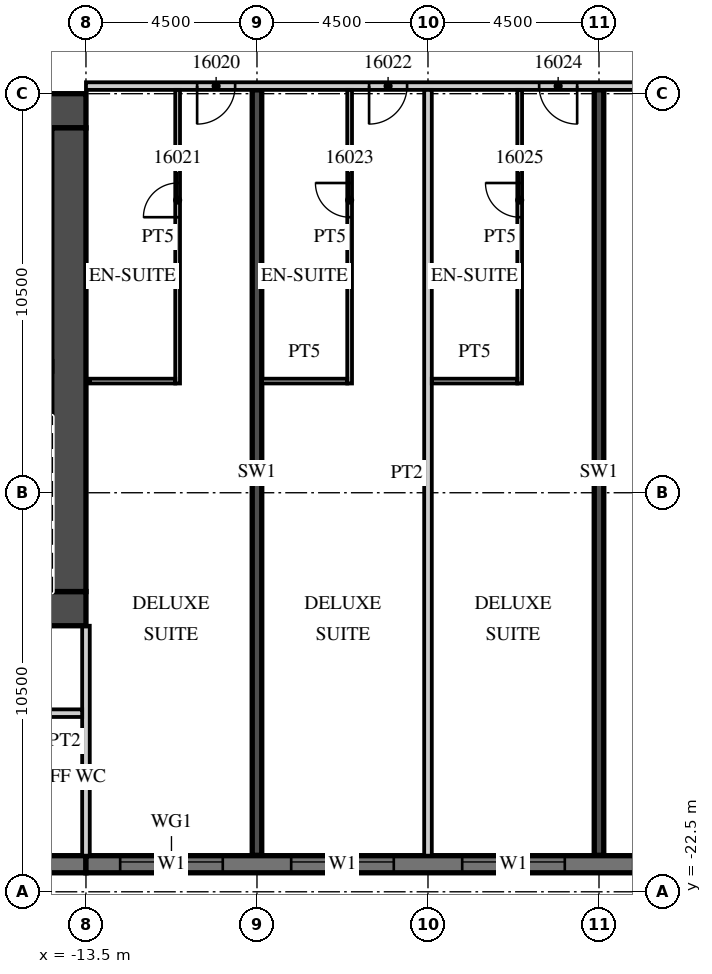
"""IFC4 building model, lengths in metres.
Left out: names, types, materials, properties, quantities, classifications, styles, units other than length and angle.
Written with IfcOpenShell. Run it as: python <this file> out.ifc"""

import sys

from ifc_helpers import new_model, si_unit, direction, frame, frame_2d, origin, place, context, subcontext, project, spatial, rectangle, extrude, element, fill, save


model = new_model("IFC4")
c1 = context("Model", 3, precision=1e-05, world=origin(), true_north=direction((0.0, 1.0)))
c2 = subcontext(c1, "Body", "Model", "MODEL_VIEW")
j1 = project(units=[si_unit("LENGTHUNIT", "METRE"), si_unit("PLANEANGLEUNIT", "RADIAN")], contexts=[c1])
p1 = place(None, origin())
s1 = spatial("IfcSite", under=j1, at=p1, CompositionType="ELEMENT")
p2 = place(p1, origin())
s2 = spatial("IfcBuilding", under=s1, at=p2, CompositionType="ELEMENT")
p3 = place(p2, frame((0.0, 0.0, 83.1)))
s3 = spatial("IfcBuildingStorey", under=s2, at=p3, CompositionType="ELEMENT", Elevation=83.1)
for number, where, z_axis, x_axis in (
    (1, (-9.0, -21.54, 0.0), (0.0, 0.0, 1.0), (0.0, 1.0, 0.0)),
    (2, (0.0, -21.54, 0.0), (0.0, 0.0, 1.0), (0.0, 1.0, 0.0)),
):
    element("IfcWall", number, at=place(p3, frame(where, z_axis=z_axis, x_axis=x_axis)), inside=s3, PredefinedType="SHEAR", context=c2, shape_type="SweptSolid", body=[
        extrude(rectangle(XDim=20.14, YDim=0.25, at=frame_2d((10.07, 0.0))), origin(), (0.0, 0.0, 1.0), 3.3),
    ])
p4 = place(p3, frame((-31.5, -21.775, 0.0), z_axis=(0.0, 0.0, 1.0), x_axis=(1.0, 0.0, 0.0)))
e3 = element("IfcWall", 3, at=p4, inside=s3, PredefinedType="SOLIDWALL", context=c2, shape_type="SweptSolid", body=[
    extrude(rectangle(XDim=18.0, YDim=0.45, at=frame_2d((9.0, 0.0))), origin(), (0.0, 0.0, 1.0), 3.02),
])
p5 = place(p3, frame((-13.5, -21.775, 0.0), z_axis=(0.0, 0.0, 1.0), x_axis=(1.0, 0.0, 0.0)))
e4 = element("IfcWall", 4, at=p5, inside=s3, PredefinedType="SOLIDWALL", context=c2, shape_type="SweptSolid", body=[
    extrude(rectangle(XDim=54.5, YDim=0.45, at=frame_2d((27.25, 0.0))), origin(), (0.0, 0.0, 1.0), 3.02),
])
p6 = place(p5, frame((0.9, 0.0, 0.45)))
e5 = element("IfcOpeningElement", 5, at=p6, cuts=e4, PredefinedType="OPENING", context=c2, shape_type="SweptSolid", body=[
    extrude(rectangle(XDim=2.7, YDim=2.25, at=frame_2d((1.35, 1.125))), frame((0.0, 0.235, 0.0), z_axis=(0.0, -1.0, 0.0), x_axis=(1.0, 0.0, 0.0)), (0.0, 0.0, 1.0), 0.47),
])
p7 = place(p5, frame((5.4, 0.0, 0.45)))
e6 = element("IfcOpeningElement", 6, at=p7, cuts=e4, PredefinedType="OPENING", context=c2, shape_type="SweptSolid", body=[
    extrude(rectangle(XDim=2.7, YDim=2.25, at=frame_2d((1.35, 1.125))), frame((0.0, 0.235, 0.0), z_axis=(0.0, -1.0, 0.0), x_axis=(1.0, 0.0, 0.0)), (0.0, 0.0, 1.0), 0.47),
])
p8 = place(p5, frame((9.9, 0.0, 0.45)))
e7 = element("IfcOpeningElement", 7, at=p8, cuts=e4, PredefinedType="OPENING", context=c2, shape_type="SweptSolid", body=[
    extrude(rectangle(XDim=2.7, YDim=2.25, at=frame_2d((1.35, 1.125))), frame((0.0, 0.235, 0.0), z_axis=(0.0, -1.0, 0.0), x_axis=(1.0, 0.0, 0.0)), (0.0, 0.0, 1.0), 0.47),
])
p9 = place(p5, frame((14.4, 0.0, 0.45)))
e8 = element("IfcOpeningElement", 8, at=p9, cuts=e4, PredefinedType="OPENING", context=c2, shape_type="SweptSolid", body=[
    extrude(rectangle(XDim=2.7, YDim=2.25, at=frame_2d((1.35, 1.125))), frame((0.0, 0.235, 0.0), z_axis=(0.0, -1.0, 0.0), x_axis=(1.0, 0.0, 0.0)), (0.0, 0.0, 1.0), 0.47),
])
p10 = place(p5, frame((18.9, 0.0, 0.45)))
e9 = element("IfcOpeningElement", 9, at=p10, cuts=e4, PredefinedType="OPENING", context=c2, shape_type="SweptSolid", body=[
    extrude(rectangle(XDim=2.7, YDim=2.25, at=frame_2d((1.35, 1.125))), frame((0.0, 0.235, 0.0), z_axis=(0.0, -1.0, 0.0), x_axis=(1.0, 0.0, 0.0)), (0.0, 0.0, 1.0), 0.47),
])
p11 = place(p5, frame((23.4, 0.0, 0.45)))
e10 = element("IfcOpeningElement", 10, at=p11, cuts=e4, PredefinedType="OPENING", context=c2, shape_type="SweptSolid", body=[
    extrude(rectangle(XDim=2.7, YDim=2.25, at=frame_2d((1.35, 1.125))), frame((0.0, 0.235, 0.0), z_axis=(0.0, -1.0, 0.0), x_axis=(1.0, 0.0, 0.0)), (0.0, 0.0, 1.0), 0.47),
])
p12 = place(p5, frame((27.9, 0.0, 0.45)))
e11 = element("IfcOpeningElement", 11, at=p12, cuts=e4, PredefinedType="OPENING", context=c2, shape_type="SweptSolid", body=[
    extrude(rectangle(XDim=2.7, YDim=2.25, at=frame_2d((1.35, 1.125))), frame((0.0, 0.235, 0.0), z_axis=(0.0, -1.0, 0.0), x_axis=(1.0, 0.0, 0.0)), (0.0, 0.0, 1.0), 0.47),
])
p13 = place(p5, frame((32.4, 0.0, 0.45)))
e12 = element("IfcOpeningElement", 12, at=p13, cuts=e4, PredefinedType="OPENING", context=c2, shape_type="SweptSolid", body=[
    extrude(rectangle(XDim=2.7, YDim=2.25, at=frame_2d((1.35, 1.125))), frame((0.0, 0.235, 0.0), z_axis=(0.0, -1.0, 0.0), x_axis=(1.0, 0.0, 0.0)), (0.0, 0.0, 1.0), 0.47),
])
p14 = place(p5, frame((36.9, 0.0, 0.45)))
e13 = element("IfcOpeningElement", 13, at=p14, cuts=e4, PredefinedType="OPENING", context=c2, shape_type="SweptSolid", body=[
    extrude(rectangle(XDim=2.7, YDim=2.25, at=frame_2d((1.35, 1.125))), frame((0.0, 0.235, 0.0), z_axis=(0.0, -1.0, 0.0), x_axis=(1.0, 0.0, 0.0)), (0.0, 0.0, 1.0), 0.47),
])
p15 = place(p5, frame((41.4, 0.0, 0.45)))
e14 = element("IfcOpeningElement", 14, at=p15, cuts=e4, PredefinedType="OPENING", context=c2, shape_type="SweptSolid", body=[
    extrude(rectangle(XDim=2.7, YDim=2.25, at=frame_2d((1.35, 1.125))), frame((0.0, 0.235, 0.0), z_axis=(0.0, -1.0, 0.0), x_axis=(1.0, 0.0, 0.0)), (0.0, 0.0, 1.0), 0.47),
])
p16 = place(p5, frame((45.9, 0.0, 0.45)))
e15 = element("IfcOpeningElement", 15, at=p16, cuts=e4, PredefinedType="OPENING", context=c2, shape_type="SweptSolid", body=[
    extrude(rectangle(XDim=2.7, YDim=2.25, at=frame_2d((1.35, 1.125))), frame((0.0, 0.235, 0.0), z_axis=(0.0, -1.0, 0.0), x_axis=(1.0, 0.0, 0.0)), (0.0, 0.0, 1.0), 0.47),
])
p17 = place(p5, frame((50.4, 0.0, 0.45)))
e16 = element("IfcOpeningElement", 16, at=p17, cuts=e4, PredefinedType="OPENING", context=c2, shape_type="SweptSolid", body=[
    extrude(rectangle(XDim=2.7, YDim=2.25, at=frame_2d((1.35, 1.125))), frame((0.0, 0.235, 0.0), z_axis=(0.0, -1.0, 0.0), x_axis=(1.0, 0.0, 0.0)), (0.0, 0.0, 1.0), 0.47),
])
p18 = place(p3, frame((-13.5, -21.55, 0.0), z_axis=(0.0, 0.0, 1.0), x_axis=(0.0, 1.0, 0.0)))
e17 = element("IfcWall", 17, at=p18, inside=s3, PredefinedType="PARTITIONING", context=c2, shape_type="SweptSolid", body=[
    extrude(rectangle(XDim=6.05, YDim=0.2, at=frame_2d((3.025, 0.0))), origin(), (0.0, 0.0, 1.0), 3.02),
])
p19 = place(p3, frame((-13.5, -1.3, 0.0), z_axis=(0.0, 0.0, 1.0), x_axis=(1.0, 0.0, 0.0)))
e18 = element("IfcWall", 18, at=p19, inside=s3, PredefinedType="PARTITIONING", context=c2, shape_type="SweptSolid", body=[
    extrude(rectangle(XDim=58.05, YDim=0.2, at=frame_2d((29.025, 0.0))), origin(), (0.0, 0.0, 1.0), 3.02),
])
p20 = place(p19, frame((2.925, 0.0, 0.0)))
e19 = element("IfcOpeningElement", 19, at=p20, cuts=e18, PredefinedType="OPENING", context=c2, shape_type="SweptSolid", body=[
    extrude(rectangle(XDim=1.0, YDim=2.1, at=frame_2d((0.5, 1.05))), frame((0.0, 0.11, 0.0), z_axis=(0.0, -1.0, 0.0), x_axis=(1.0, 0.0, 0.0)), (0.0, 0.0, 1.0), 0.22),
])
p21 = place(p19, frame((7.45, 0.0, 0.0)))
e20 = element("IfcOpeningElement", 20, at=p21, cuts=e18, PredefinedType="OPENING", context=c2, shape_type="SweptSolid", body=[
    extrude(rectangle(XDim=1.0, YDim=2.1, at=frame_2d((0.5, 1.05))), frame((0.0, 0.11, 0.0), z_axis=(0.0, -1.0, 0.0), x_axis=(1.0, 0.0, 0.0)), (0.0, 0.0, 1.0), 0.22),
])
p22 = place(p19, frame((11.925, 0.0, 0.0)))
e21 = element("IfcOpeningElement", 21, at=p22, cuts=e18, PredefinedType="OPENING", context=c2, shape_type="SweptSolid", body=[
    extrude(rectangle(XDim=1.0, YDim=2.1, at=frame_2d((0.5, 1.05))), frame((0.0, 0.11, 0.0), z_axis=(0.0, -1.0, 0.0), x_axis=(1.0, 0.0, 0.0)), (0.0, 0.0, 1.0), 0.22),
])
p23 = place(p19, frame((15.938, 0.0, 0.0)))
e22 = element("IfcOpeningElement", 22, at=p23, cuts=e18, PredefinedType="OPENING", context=c2, shape_type="SweptSolid", body=[
    extrude(rectangle(XDim=1.2, YDim=2.1, at=frame_2d((0.6, 1.05))), frame((0.0, 0.11, 0.0), z_axis=(0.0, -1.0, 0.0), x_axis=(1.0, 0.0, 0.0)), (0.0, 0.0, 1.0), 0.22),
])
p24 = place(p19, frame((25.45, 0.0, 0.0)))
e23 = element("IfcOpeningElement", 23, at=p24, cuts=e18, PredefinedType="OPENING", context=c2, shape_type="SweptSolid", body=[
    extrude(rectangle(XDim=1.0, YDim=2.1, at=frame_2d((0.5, 1.05))), frame((0.0, 0.11, 0.0), z_axis=(0.0, -1.0, 0.0), x_axis=(1.0, 0.0, 0.0)), (0.0, 0.0, 1.0), 0.22),
])
p25 = place(p19, frame((29.925, 0.0, 0.0)))
e24 = element("IfcOpeningElement", 24, at=p25, cuts=e18, PredefinedType="OPENING", context=c2, shape_type="SweptSolid", body=[
    extrude(rectangle(XDim=1.0, YDim=2.1, at=frame_2d((0.5, 1.05))), frame((0.0, 0.11, 0.0), z_axis=(0.0, -1.0, 0.0), x_axis=(1.0, 0.0, 0.0)), (0.0, 0.0, 1.0), 0.22),
])
p26 = place(p19, frame((36.862, 0.0, 0.0)))
e25 = element("IfcOpeningElement", 25, at=p26, cuts=e18, PredefinedType="OPENING", context=c2, shape_type="SweptSolid", body=[
    extrude(rectangle(XDim=1.2, YDim=2.1, at=frame_2d((0.6, 1.05))), frame((0.0, 0.11, 0.0), z_axis=(0.0, -1.0, 0.0), x_axis=(1.0, 0.0, 0.0)), (0.0, 0.0, 1.0), 0.22),
])
p27 = place(p19, frame((41.075, 0.0, 0.0)))
e26 = element("IfcOpeningElement", 26, at=p27, cuts=e18, PredefinedType="OPENING", context=c2, shape_type="SweptSolid", body=[
    extrude(rectangle(XDim=1.0, YDim=2.1, at=frame_2d((0.5, 1.05))), frame((0.0, 0.11, 0.0), z_axis=(0.0, -1.0, 0.0), x_axis=(1.0, 0.0, 0.0)), (0.0, 0.0, 1.0), 0.22),
])
p28 = place(p19, frame((45.55, 0.0, 0.0)))
e27 = element("IfcOpeningElement", 27, at=p28, cuts=e18, PredefinedType="OPENING", context=c2, shape_type="SweptSolid", body=[
    extrude(rectangle(XDim=1.0, YDim=2.1, at=frame_2d((0.5, 1.05))), frame((0.0, 0.11, 0.0), z_axis=(0.0, -1.0, 0.0), x_axis=(1.0, 0.0, 0.0)), (0.0, 0.0, 1.0), 0.22),
])
p29 = place(p19, frame((52.425, 0.0, 0.0)))
e28 = element("IfcOpeningElement", 28, at=p29, cuts=e18, PredefinedType="OPENING", context=c2, shape_type="SweptSolid", body=[
    extrude(rectangle(XDim=1.0, YDim=2.1, at=frame_2d((0.5, 1.05))), frame((0.0, 0.11, 0.0), z_axis=(0.0, -1.0, 0.0), x_axis=(1.0, 0.0, 0.0)), (0.0, 0.0, 1.0), 0.22),
])
p30 = place(p19, frame((56.525, 0.0, 0.0)))
e29 = element("IfcOpeningElement", 29, at=p30, cuts=e18, PredefinedType="OPENING", context=c2, shape_type="SweptSolid", body=[
    extrude(rectangle(XDim=1.0, YDim=2.1, at=frame_2d((0.5, 1.05))), frame((0.0, 0.11, 0.0), z_axis=(0.0, -1.0, 0.0), x_axis=(1.0, 0.0, 0.0)), (0.0, 0.0, 1.0), 0.22),
])
p31 = place(p3, frame((-11.088, -9.125, 0.0), z_axis=(0.0, 0.0, 1.0), x_axis=(0.0, 1.0, 0.0)))
e30 = element("IfcWall", 30, at=p31, inside=s3, PredefinedType="PARTITIONING", context=c2, shape_type="SweptSolid", body=[
    extrude(rectangle(XDim=7.725, YDim=0.125, at=frame_2d((3.863, 0.0))), origin(), (0.0, 0.0, 1.0), 3.02),
])
p32 = place(p31, frame((4.375, 0.0, 0.0)))
e31 = element("IfcOpeningElement", 31, at=p32, cuts=e30, PredefinedType="OPENING", context=c2, shape_type="SweptSolid", body=[
    extrude(rectangle(XDim=0.9, YDim=2.1, at=frame_2d((0.45, 1.05))), frame((0.0, 0.073, 0.0), z_axis=(0.0, -1.0, 0.0), x_axis=(1.0, 0.0, 0.0)), (0.0, 0.0, 1.0), 0.145),
])
p33 = place(p3, frame((-13.4, -9.062, 0.0), z_axis=(0.0, 0.0, 1.0), x_axis=(1.0, 0.0, 0.0)))
e32 = element("IfcWall", 32, at=p33, inside=s3, PredefinedType="PARTITIONING", context=c2, shape_type="SweptSolid", body=[
    extrude(rectangle(XDim=2.25, YDim=0.125, at=frame_2d((1.125, 0.0))), origin(), (0.0, 0.0, 1.0), 3.02),
])
p34 = place(p3, frame((-4.5, -21.55, 0.0), z_axis=(0.0, 0.0, 1.0), x_axis=(0.0, 1.0, 0.0)))
e33 = element("IfcWall", 33, at=p34, inside=s3, PredefinedType="PARTITIONING", context=c2, shape_type="SweptSolid", body=[
    extrude(rectangle(XDim=20.15, YDim=0.2, at=frame_2d((10.075, 0.0))), origin(), (0.0, 0.0, 1.0), 3.02),
])
p35 = place(p3, frame((-6.562, -9.125, 0.0), z_axis=(0.0, 0.0, 1.0), x_axis=(0.0, 1.0, 0.0)))
e34 = element("IfcWall", 34, at=p35, inside=s3, PredefinedType="PARTITIONING", context=c2, shape_type="SweptSolid", body=[
    extrude(rectangle(XDim=7.725, YDim=0.125, at=frame_2d((3.863, 0.0))), origin(), (0.0, 0.0, 1.0), 3.02),
])
p36 = place(p35, frame((4.375, 0.0, 0.0)))
e35 = element("IfcOpeningElement", 35, at=p36, cuts=e34, PredefinedType="OPENING", context=c2, shape_type="SweptSolid", body=[
    extrude(rectangle(XDim=0.9, YDim=2.1, at=frame_2d((0.45, 1.05))), frame((0.0, 0.073, 0.0), z_axis=(0.0, -1.0, 0.0), x_axis=(1.0, 0.0, 0.0)), (0.0, 0.0, 1.0), 0.145),
])
p37 = place(p3, frame((-8.875, -9.062, 0.0), z_axis=(0.0, 0.0, 1.0), x_axis=(1.0, 0.0, 0.0)))
e36 = element("IfcWall", 36, at=p37, inside=s3, PredefinedType="PARTITIONING", context=c2, shape_type="SweptSolid", body=[
    extrude(rectangle(XDim=2.25, YDim=0.125, at=frame_2d((1.125, 0.0))), origin(), (0.0, 0.0, 1.0), 3.02),
])
p38 = place(p3, frame((-2.087, -9.125, 0.0), z_axis=(0.0, 0.0, 1.0), x_axis=(0.0, 1.0, 0.0)))
e37 = element("IfcWall", 37, at=p38, inside=s3, PredefinedType="PARTITIONING", context=c2, shape_type="SweptSolid", body=[
    extrude(rectangle(XDim=7.725, YDim=0.125, at=frame_2d((3.863, 0.0))), origin(), (0.0, 0.0, 1.0), 3.02),
])
p39 = place(p38, frame((4.375, 0.0, 0.0)))
e38 = element("IfcOpeningElement", 38, at=p39, cuts=e37, PredefinedType="OPENING", context=c2, shape_type="SweptSolid", body=[
    extrude(rectangle(XDim=0.9, YDim=2.1, at=frame_2d((0.45, 1.05))), frame((0.0, 0.073, 0.0), z_axis=(0.0, -1.0, 0.0), x_axis=(1.0, 0.0, 0.0)), (0.0, 0.0, 1.0), 0.145),
])
p40 = place(p3, frame((-4.4, -9.062, 0.0), z_axis=(0.0, 0.0, 1.0), x_axis=(1.0, 0.0, 0.0)))
e39 = element("IfcWall", 39, at=p40, inside=s3, PredefinedType="PARTITIONING", context=c2, shape_type="SweptSolid", body=[
    extrude(rectangle(XDim=2.25, YDim=0.125, at=frame_2d((1.125, 0.0))), origin(), (0.0, 0.0, 1.0), 3.02),
])
p41 = place(p3, frame((-31.5, -1.95, 0.0), z_axis=(0.0, 0.0, 1.0), x_axis=(1.0, 0.0, 0.0)))
e40 = element("IfcWall", 40, at=p41, inside=s3, PredefinedType="SHEAR", context=c2, shape_type="SweptSolid", body=[
    extrude(rectangle(XDim=18.0, YDim=0.9, at=frame_2d((9.0, 0.0))), origin(), (0.0, 0.0, 1.0), 3.02),
])
p42 = place(p41, frame((14.725, 0.0, 0.0)))
e41 = element("IfcOpeningElement", 41, at=p42, cuts=e40, PredefinedType="OPENING", context=c2, shape_type="SweptSolid", body=[
    extrude(rectangle(XDim=1.8, YDim=2.1, at=frame_2d((0.9, 1.05))), frame((0.0, 0.46, 0.0), z_axis=(0.0, -1.0, 0.0), x_axis=(1.0, 0.0, 0.0)), (0.0, 0.0, 1.0), 0.92),
])
p43 = place(p3, frame((-20.3, -15.05, 0.0), z_axis=(0.0, 0.0, 1.0), x_axis=(1.0, 0.0, 0.0)))
e42 = element("IfcWall", 42, at=p43, inside=s3, PredefinedType="SHEAR", context=c2, shape_type="SweptSolid", body=[
    extrude(rectangle(XDim=6.8, YDim=0.9, at=frame_2d((3.4, 0.0))), origin(), (0.0, 0.0, 1.0), 3.02),
])
p44 = place(p43, frame((0.875, 0.0, 0.0)))
e43 = element("IfcOpeningElement", 43, at=p44, cuts=e42, PredefinedType="OPENING", context=c2, shape_type="SweptSolid", body=[
    extrude(rectangle(XDim=1.2, YDim=2.1, at=frame_2d((0.6, 1.05))), frame((0.0, 0.46, 0.0), z_axis=(0.0, -1.0, 0.0), x_axis=(1.0, 0.0, 0.0)), (0.0, 0.0, 1.0), 0.92),
])
p45 = place(p3, frame((-13.95, -14.6, 0.0), z_axis=(0.0, 0.0, 1.0), x_axis=(0.0, 1.0, 0.0)))
e44 = element("IfcWall", 44, at=p45, inside=s3, PredefinedType="SHEAR", context=c2, shape_type="SweptSolid", body=[
    extrude(rectangle(XDim=12.2, YDim=0.9, at=frame_2d((6.1, 0.0))), origin(), (0.0, 0.0, 1.0), 3.02),
])
p46 = place(p3, frame((-44.55, -17.8, 0.0), z_axis=(0.0, 0.0, 1.0), x_axis=(1.0, 0.0, 0.0)))
e45 = element("IfcWall", 45, at=p46, inside=s3, PredefinedType="PARTITIONING", context=c2, shape_type="SweptSolid", body=[
    extrude(rectangle(XDim=30.95, YDim=0.2, at=frame_2d((15.475, 0.0))), origin(), (0.0, 0.0, 1.0), 3.02),
])
p47 = place(p46, frame((15.038, 0.0, 0.0)))
e46 = element("IfcOpeningElement", 46, at=p47, cuts=e45, PredefinedType="OPENING", context=c2, shape_type="SweptSolid", body=[
    extrude(rectangle(XDim=0.9, YDim=2.1, at=frame_2d((0.45, 1.05))), frame((0.0, 0.11, 0.0), z_axis=(0.0, -1.0, 0.0), x_axis=(1.0, 0.0, 0.0)), (0.0, 0.0, 1.0), 0.22),
])
p48 = place(p46, frame((23.337, 0.0, 0.0)))
e47 = element("IfcOpeningElement", 47, at=p48, cuts=e45, PredefinedType="OPENING", context=c2, shape_type="SweptSolid", body=[
    extrude(rectangle(XDim=0.9, YDim=2.1, at=frame_2d((0.45, 1.05))), frame((0.0, 0.11, 0.0), z_axis=(0.0, -1.0, 0.0), x_axis=(1.0, 0.0, 0.0)), (0.0, 0.0, 1.0), 0.22),
])
p49 = place(p6, origin())
e48 = element("IfcWindow", 48, at=p49, inside=s3, PartitioningType="SINGLE_PANEL", PredefinedType="WINDOW", context=c2, shape_type="SweptSolid", body=[
    extrude(rectangle(XDim=2.7, YDim=2.25, at=frame_2d((1.35, 1.125))), frame((0.0, 0.09, 0.0), z_axis=(0.0, -1.0, 0.0), x_axis=(1.0, 0.0, 0.0)), (0.0, 0.0, 1.0), 0.06),
])
fill(e5, e48)
p50 = place(p7, origin())
e49 = element("IfcWindow", 49, at=p50, inside=s3, PartitioningType="SINGLE_PANEL", PredefinedType="WINDOW", context=c2, shape_type="SweptSolid", body=[
    extrude(rectangle(XDim=2.7, YDim=2.25, at=frame_2d((1.35, 1.125))), frame((0.0, 0.09, 0.0), z_axis=(0.0, -1.0, 0.0), x_axis=(1.0, 0.0, 0.0)), (0.0, 0.0, 1.0), 0.06),
])
fill(e6, e49)
p51 = place(p8, origin())
e50 = element("IfcWindow", 50, at=p51, inside=s3, PartitioningType="SINGLE_PANEL", PredefinedType="WINDOW", context=c2, shape_type="SweptSolid", body=[
    extrude(rectangle(XDim=2.7, YDim=2.25, at=frame_2d((1.35, 1.125))), frame((0.0, 0.09, 0.0), z_axis=(0.0, -1.0, 0.0), x_axis=(1.0, 0.0, 0.0)), (0.0, 0.0, 1.0), 0.06),
])
fill(e7, e50)
p52 = place(p20, origin())
e51 = element("IfcDoor", 51, at=p52, inside=s3, OperationType="SINGLE_SWING_LEFT", PredefinedType="DOOR", context=c2, shape_type="SweptSolid", body=[
    extrude(rectangle(XDim=1.0, YDim=2.1, at=frame_2d((0.5, 1.05))), frame((0.0, 0.025, 0.0), z_axis=(0.0, -1.0, 0.0), x_axis=(1.0, 0.0, 0.0)), (0.0, 0.0, 1.0), 0.05),
])
fill(e19, e51)
p53 = place(p32, origin())
e52 = element("IfcDoor", 52, at=p53, inside=s3, OperationType="SINGLE_SWING_LEFT", PredefinedType="DOOR", context=c2, shape_type="SweptSolid", body=[
    extrude(rectangle(XDim=0.9, YDim=2.1, at=frame_2d((0.45, 1.05))), frame((0.0, 0.025, 0.0), z_axis=(0.0, -1.0, 0.0), x_axis=(1.0, 0.0, 0.0)), (0.0, 0.0, 1.0), 0.05),
])
fill(e31, e52)
p54 = place(p21, origin())
e53 = element("IfcDoor", 53, at=p54, inside=s3, OperationType="SINGLE_SWING_LEFT", PredefinedType="DOOR", context=c2, shape_type="SweptSolid", body=[
    extrude(rectangle(XDim=1.0, YDim=2.1, at=frame_2d((0.5, 1.05))), frame((0.0, 0.025, 0.0), z_axis=(0.0, -1.0, 0.0), x_axis=(1.0, 0.0, 0.0)), (0.0, 0.0, 1.0), 0.05),
])
fill(e20, e53)
p55 = place(p36, origin())
e54 = element("IfcDoor", 54, at=p55, inside=s3, OperationType="SINGLE_SWING_RIGHT", PredefinedType="DOOR", context=c2, shape_type="SweptSolid", body=[
    extrude(rectangle(XDim=0.9, YDim=2.1, at=frame_2d((0.45, 1.05))), frame((0.0, 0.025, 0.0), z_axis=(0.0, -1.0, 0.0), x_axis=(1.0, 0.0, 0.0)), (0.0, 0.0, 1.0), 0.05),
])
fill(e35, e54)
p56 = place(p22, origin())
e55 = element("IfcDoor", 55, at=p56, inside=s3, OperationType="SINGLE_SWING_RIGHT", PredefinedType="DOOR", context=c2, shape_type="SweptSolid", body=[
    extrude(rectangle(XDim=1.0, YDim=2.1, at=frame_2d((0.5, 1.05))), frame((0.0, 0.025, 0.0), z_axis=(0.0, -1.0, 0.0), x_axis=(1.0, 0.0, 0.0)), (0.0, 0.0, 1.0), 0.05),
])
fill(e21, e55)
p57 = place(p39, origin())
e56 = element("IfcDoor", 56, at=p57, inside=s3, OperationType="SINGLE_SWING_RIGHT", PredefinedType="DOOR", context=c2, shape_type="SweptSolid", body=[
    extrude(rectangle(XDim=0.9, YDim=2.1, at=frame_2d((0.45, 1.05))), frame((0.0, 0.025, 0.0), z_axis=(0.0, -1.0, 0.0), x_axis=(1.0, 0.0, 0.0)), (0.0, 0.0, 1.0), 0.05),
])
fill(e38, e56)
save(model, sys.argv[1])
